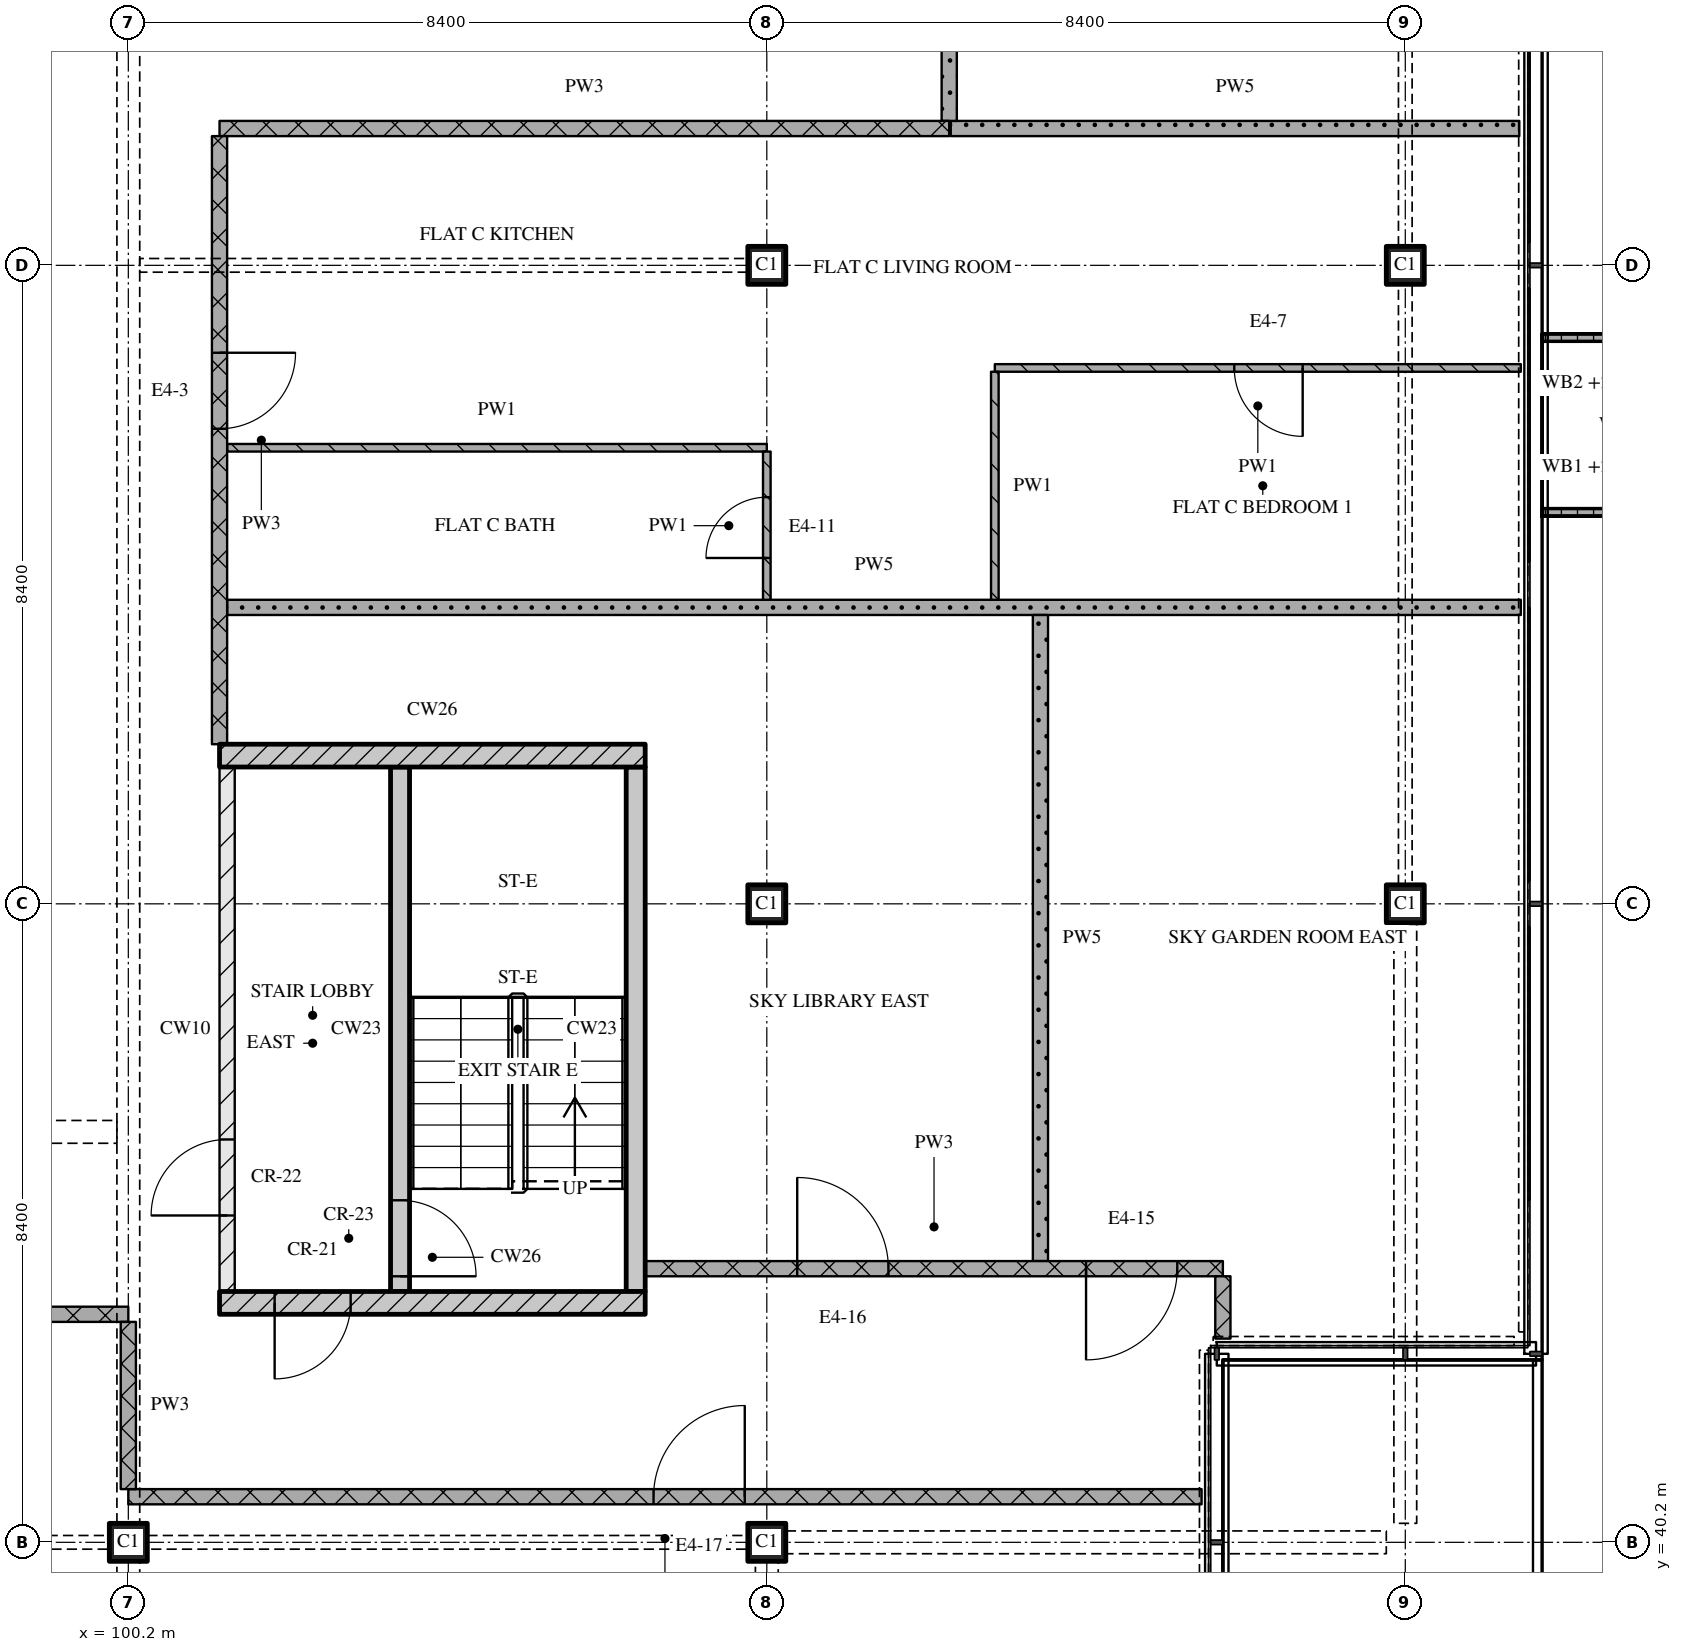
"""IFC4 building model, lengths in metres.
Left out: names, types, materials, properties, quantities, classifications, styles, units other than length and angle.
Written with IfcOpenShell. Run it as: python <this file> out.ifc"""

import sys

from ifc_helpers import new_model, si_unit, direction, frame, frame_2d, origin, origin_2d, place, context, subcontext, project, spatial, polyline, rectangle, outline, extrude, element, fill, save


model = new_model("IFC4")
c1 = context("Model", 3, precision=1e-05, world=origin(), true_north=direction((0.0, 1.0)))
c2 = subcontext(c1, "Body", "Model", "MODEL_VIEW")
j1 = project(units=[si_unit("LENGTHUNIT", "METRE"), si_unit("PLANEANGLEUNIT", "RADIAN")], contexts=[c1])
p1 = place(None, origin())
s1 = spatial("IfcSite", under=j1, at=p1, CompositionType="ELEMENT")
p2 = place(p1, origin())
s2 = spatial("IfcBuilding", under=s1, at=p2, CompositionType="ELEMENT")
p3 = place(p2, frame((0.0, 0.0, 285.15)))
s3 = spatial("IfcBuildingStorey", under=s2, at=p3, CompositionType="ELEMENT", Elevation=285.15)
for number, where, z_axis, x_axis in (
    (1, (100.2, 40.2, 0.0), (0.0, 0.0, 1.0), (1.0, 0.0, 0.0)),
    (2, (108.6, 40.2, 0.0), (0.0, 0.0, 1.0), (1.0, 0.0, 0.0)),
    (3, (108.6, 48.6, 0.0), (0.0, 0.0, 1.0), (1.0, 0.0, 0.0)),
    (4, (108.6, 57.0, 0.0), (0.0, 0.0, 1.0), (1.0, 0.0, 0.0)),
    (5, (117.0, 48.6, 0.0), (0.0, 0.0, 1.0), (1.0, 0.0, 0.0)),
    (6, (117.0, 57.0, 0.0), (0.0, 0.0, 1.0), (1.0, 0.0, 0.0)),
):
    element("IfcColumn", number, at=place(p3, frame(where, z_axis=z_axis, x_axis=x_axis)), inside=s3, PredefinedType="COLUMN", context=c2, shape_type="SweptSolid", body=[
        extrude(rectangle(XDim=0.5, YDim=0.5, at=origin_2d()), origin(), (0.0, 0.0, 1.0), 3.6),
    ])
p4 = place(p3, origin())
e7 = element("IfcWall", 7, at=p4, inside=s3, PredefinedType="SOLIDWALL", context=c2, shape_type="SweptSolid", body=[
    extrude(outline(polyline([(118.8, 53.7), (118.8, 53.8), (120.3, 53.8), (120.3, 56.0), (118.8, 56.0), (118.8, 56.1), (120.4, 56.1), (120.4, 53.7), (118.8, 53.7)])), origin(), (0.0, 0.0, 1.0), 1.0),
])
p5 = place(p3, frame((101.4, 43.35, 0.0), z_axis=(0.0, 0.0, 1.0), x_axis=(1.0, 0.0, 0.0)))
e8 = element("IfcWall", 8, at=p5, inside=s3, PredefinedType="SOLIDWALL", context=c2, shape_type="SweptSolid", body=[
    extrude(rectangle(XDim=5.6, YDim=0.3, at=frame_2d((2.8, 0.0))), origin(), (0.0, 0.0, 1.0), 3.32),
])
p6 = place(p5, frame((0.725, 0.0, 0.0)))
e9 = element("IfcOpeningElement", 9, at=p6, cuts=e8, PredefinedType="OPENING", context=c2, shape_type="SweptSolid", body=[
    extrude(rectangle(XDim=1.0, YDim=2.1, at=frame_2d((0.5, 1.05))), frame((0.0, 0.16, 0.0), z_axis=(0.0, -1.0, 0.0), x_axis=(1.0, 0.0, 0.0)), (0.0, 0.0, 1.0), 0.32),
])
p7 = place(p3, frame((101.5, 43.5, 0.0), z_axis=(0.0, 0.0, 1.0), x_axis=(0.0, 1.0, 0.0)))
e10 = element("IfcWall", 10, at=p7, inside=s3, PredefinedType="PARTITIONING", context=c2, shape_type="SweptSolid", body=[
    extrude(rectangle(XDim=6.9, YDim=0.2, at=frame_2d((3.45, 0.0))), origin(), (0.0, 0.0, 1.0), 3.32),
])
p8 = place(p7, frame((1.0, 0.0, 0.0)))
e11 = element("IfcOpeningElement", 11, at=p8, cuts=e10, PredefinedType="OPENING", context=c2, shape_type="SweptSolid", body=[
    extrude(rectangle(XDim=1.0, YDim=2.1, at=frame_2d((0.5, 1.05))), frame((0.0, 0.11, 0.0), z_axis=(0.0, -1.0, 0.0), x_axis=(1.0, 0.0, 0.0)), (0.0, 0.0, 1.0), 0.22),
])
p9 = place(p3, frame((103.775, 43.5, 0.0), z_axis=(0.0, 0.0, 1.0), x_axis=(0.0, 1.0, 0.0)))
e12 = element("IfcWall", 12, at=p9, inside=s3, PredefinedType="SOLIDWALL", context=c2, shape_type="SweptSolid", body=[
    extrude(rectangle(XDim=6.9, YDim=0.25, at=frame_2d((3.45, 0.0))), origin(), (0.0, 0.0, 1.0), 3.32),
])
p10 = place(p9, frame((0.2, 0.0, 0.0)))
e13 = element("IfcOpeningElement", 13, at=p10, cuts=e12, PredefinedType="OPENING", context=c2, shape_type="SweptSolid", body=[
    extrude(rectangle(XDim=1.0, YDim=2.1, at=frame_2d((0.5, 1.05))), frame((0.0, 0.135, 0.0), z_axis=(0.0, -1.0, 0.0), x_axis=(1.0, 0.0, 0.0)), (0.0, 0.0, 1.0), 0.27),
])
p11 = place(p3, frame((106.875, 43.5, 0.0), z_axis=(0.0, 0.0, 1.0), x_axis=(0.0, 1.0, 0.0)))
e14 = element("IfcWall", 14, at=p11, inside=s3, PredefinedType="SOLIDWALL", context=c2, shape_type="SweptSolid", body=[
    extrude(rectangle(XDim=6.9, YDim=0.25, at=frame_2d((3.45, 0.0))), origin(), (0.0, 0.0, 1.0), 3.32),
])
p12 = place(p3, frame((101.4, 50.55, 0.0), z_axis=(0.0, 0.0, 1.0), x_axis=(1.0, 0.0, 0.0)))
e15 = element("IfcWall", 15, at=p12, inside=s3, PredefinedType="SOLIDWALL", context=c2, shape_type="SweptSolid", body=[
    extrude(rectangle(XDim=5.6, YDim=0.3, at=frame_2d((2.8, 0.0))), origin(), (0.0, 0.0, 1.0), 3.32),
])
p13 = place(p3, frame((114.32, 40.8, 0.0), z_axis=(0.0, 0.0, 1.0), x_axis=(-1.0, 0.0, 0.0)))
e16 = element("IfcWall", 16, at=p13, inside=s3, PredefinedType="PARTITIONING", context=c2, shape_type="SweptSolid", body=[
    extrude(rectangle(XDim=14.12, YDim=0.2, at=frame_2d((7.06, 0.0))), origin(), (0.0, 0.0, 1.0), 3.32),
])
p14 = place(p13, frame((6.01, 0.0, 0.0)))
e17 = element("IfcOpeningElement", 17, at=p14, cuts=e16, PredefinedType="OPENING", context=c2, shape_type="SweptSolid", body=[
    extrude(rectangle(XDim=1.2, YDim=2.1, at=frame_2d((0.6, 1.05))), frame((0.0, 0.11, 0.0), z_axis=(0.0, -1.0, 0.0), x_axis=(1.0, 0.0, 0.0)), (0.0, 0.0, 1.0), 0.22),
])
p15 = place(p3, frame((100.2, 43.2, 0.0), z_axis=(0.0, 0.0, 1.0), x_axis=(-1.0, 0.0, 0.0)))
e18 = element("IfcWall", 18, at=p15, inside=s3, PredefinedType="PARTITIONING", context=c2, shape_type="SweptSolid", body=[
    extrude(rectangle(XDim=25.2, YDim=0.2, at=frame_2d((12.6, 0.0))), origin(), (0.0, 0.0, 1.0), 3.32),
])
p16 = place(p15, frame((5.7, 0.0, 0.0)))
e19 = element("IfcOpeningElement", 19, at=p16, cuts=e18, PredefinedType="OPENING", context=c2, shape_type="SweptSolid", body=[
    extrude(rectangle(XDim=1.2, YDim=2.1, at=frame_2d((0.6, 1.05))), frame((0.0, 0.11, 0.0), z_axis=(0.0, -1.0, 0.0), x_axis=(1.0, 0.0, 0.0)), (0.0, 0.0, 1.0), 0.22),
])
p17 = place(p15, frame((18.3, 0.0, 0.0)))
e20 = element("IfcOpeningElement", 20, at=p17, cuts=e18, PredefinedType="OPENING", context=c2, shape_type="SweptSolid", body=[
    extrude(rectangle(XDim=1.2, YDim=2.1, at=frame_2d((0.6, 1.05))), frame((0.0, 0.11, 0.0), z_axis=(0.0, -1.0, 0.0), x_axis=(1.0, 0.0, 0.0)), (0.0, 0.0, 1.0), 0.22),
])
p18 = place(p3, frame((107.0, 43.8, 0.0), z_axis=(0.0, 0.0, 1.0), x_axis=(1.0, 0.0, 0.0)))
e21 = element("IfcWall", 21, at=p18, inside=s3, PredefinedType="PARTITIONING", context=c2, shape_type="SweptSolid", body=[
    extrude(rectangle(XDim=7.6, YDim=0.2, at=frame_2d((3.8, 0.0))), origin(), (0.0, 0.0, 1.0), 3.32),
])
p19 = place(p18, frame((2.0, 0.0, 0.0)))
e22 = element("IfcOpeningElement", 22, at=p19, cuts=e21, PredefinedType="OPENING", context=c2, shape_type="SweptSolid", body=[
    extrude(rectangle(XDim=1.2, YDim=2.1, at=frame_2d((0.6, 1.05))), frame((0.0, 0.11, 0.0), z_axis=(0.0, -1.0, 0.0), x_axis=(1.0, 0.0, 0.0)), (0.0, 0.0, 1.0), 0.22),
])
p20 = place(p18, frame((5.8, 0.0, 0.0)))
e23 = element("IfcOpeningElement", 23, at=p20, cuts=e21, PredefinedType="OPENING", context=c2, shape_type="SweptSolid", body=[
    extrude(rectangle(XDim=1.2, YDim=2.1, at=frame_2d((0.6, 1.05))), frame((0.0, 0.11, 0.0), z_axis=(0.0, -1.0, 0.0), x_axis=(1.0, 0.0, 0.0)), (0.0, 0.0, 1.0), 0.22),
])
p21 = place(p3, frame((101.5, 52.5, 0.0), z_axis=(0.0, 0.0, 1.0), x_axis=(1.0, 0.0, 0.0)))
e24 = element("IfcWall", 24, at=p21, inside=s3, PredefinedType="PARTITIONING", context=c2, shape_type="SweptSolid", body=[
    extrude(rectangle(XDim=17.02, YDim=0.2, at=frame_2d((8.51, 0.0))), origin(), (0.0, 0.0, 1.0), 3.32),
])
p22 = place(p3, frame((101.5, 54.6, 0.0), z_axis=(0.0, 0.0, 1.0), x_axis=(1.0, 0.0, 0.0)))
e25 = element("IfcWall", 25, at=p22, inside=s3, PredefinedType="PARTITIONING", context=c2, shape_type="SweptSolid", body=[
    extrude(rectangle(XDim=7.1, YDim=0.1, at=frame_2d((3.55, 0.0))), origin(), (0.0, 0.0, 1.0), 3.32),
])
p23 = place(p3, frame((118.52, 55.65, 0.0), z_axis=(0.0, 0.0, 1.0), x_axis=(-1.0, 0.0, 0.0)))
e26 = element("IfcWall", 26, at=p23, inside=s3, PredefinedType="PARTITIONING", context=c2, shape_type="SweptSolid", body=[
    extrude(rectangle(XDim=6.92, YDim=0.1, at=frame_2d((3.46, 0.0))), origin(), (0.0, 0.0, 1.0), 3.32),
])
p24 = place(p23, frame((2.87, 0.0, 0.0)))
e27 = element("IfcOpeningElement", 27, at=p24, cuts=e26, PredefinedType="OPENING", context=c2, shape_type="SweptSolid", body=[
    extrude(rectangle(XDim=0.9, YDim=2.1, at=frame_2d((0.45, 1.05))), frame((0.0, 0.06, 0.0), z_axis=(0.0, -1.0, 0.0), x_axis=(1.0, 0.0, 0.0)), (0.0, 0.0, 1.0), 0.12),
])
p25 = place(p3, frame((101.4, 58.8, 0.0), z_axis=(0.0, 0.0, 1.0), x_axis=(1.0, 0.0, 0.0)))
e28 = element("IfcWall", 28, at=p25, inside=s3, PredefinedType="PARTITIONING", context=c2, shape_type="SweptSolid", body=[
    extrude(rectangle(XDim=9.6, YDim=0.2, at=frame_2d((4.8, 0.0))), origin(), (0.0, 0.0, 1.0), 3.32),
])
p26 = place(p3, frame((111.02, 58.8, 0.0), z_axis=(0.0, 0.0, 1.0), x_axis=(1.0, 0.0, 0.0)))
e29 = element("IfcWall", 29, at=p26, inside=s3, PredefinedType="PARTITIONING", context=c2, shape_type="SweptSolid", body=[
    extrude(rectangle(XDim=7.48, YDim=0.2, at=frame_2d((3.74, 0.0))), origin(), (0.0, 0.0, 1.0), 3.32),
])
p27 = place(p3, frame((100.2, 43.1, 0.0), z_axis=(0.0, 0.0, 1.0), x_axis=(0.0, -1.0, 0.0)))
e30 = element("IfcWall", 30, at=p27, inside=s3, PredefinedType="PARTITIONING", context=c2, shape_type="SweptSolid", body=[
    extrude(rectangle(XDim=2.2, YDim=0.2, at=frame_2d((1.1, 0.0))), origin(), (0.0, 0.0, 1.0), 2.53),
])
p28 = place(p3, frame((101.4, 58.7, 0.0), z_axis=(0.0, 0.0, 1.0), x_axis=(0.0, -1.0, 0.0)))
e31 = element("IfcWall", 31, at=p28, inside=s3, PredefinedType="PARTITIONING", context=c2, shape_type="SweptSolid", body=[
    extrude(rectangle(XDim=8.0, YDim=0.2, at=frame_2d((4.0, 0.0))), origin(), (0.0, 0.0, 1.0), 3.32),
])
p29 = place(p28, frame((2.85, 0.0, 0.0)))
e32 = element("IfcOpeningElement", 32, at=p29, cuts=e31, PredefinedType="OPENING", context=c2, shape_type="SweptSolid", body=[
    extrude(rectangle(XDim=1.0, YDim=2.1, at=frame_2d((0.5, 1.05))), frame((0.0, 0.11, 0.0), z_axis=(0.0, -1.0, 0.0), x_axis=(1.0, 0.0, 0.0)), (0.0, 0.0, 1.0), 0.22),
])
p30 = place(p3, frame((108.6, 52.6, 0.0), z_axis=(0.0, 0.0, 1.0), x_axis=(0.0, 1.0, 0.0)))
e33 = element("IfcWall", 33, at=p30, inside=s3, PredefinedType="PARTITIONING", context=c2, shape_type="SweptSolid", body=[
    extrude(rectangle(XDim=1.95, YDim=0.1, at=frame_2d((0.975, 0.0))), origin(), (0.0, 0.0, 1.0), 3.32),
])
p31 = place(p30, frame((0.55, 0.0, 0.0)))
e34 = element("IfcOpeningElement", 34, at=p31, cuts=e33, PredefinedType="OPENING", context=c2, shape_type="SweptSolid", body=[
    extrude(rectangle(XDim=0.8, YDim=2.1, at=frame_2d((0.4, 1.05))), frame((0.0, 0.06, 0.0), z_axis=(0.0, -1.0, 0.0), x_axis=(1.0, 0.0, 0.0)), (0.0, 0.0, 1.0), 0.12),
])
p32 = place(p3, frame((111.0, 61.1, 0.0), z_axis=(0.0, 0.0, 1.0), x_axis=(0.0, -1.0, 0.0)))
e35 = element("IfcWall", 35, at=p32, inside=s3, PredefinedType="PARTITIONING", context=c2, shape_type="SweptSolid", body=[
    extrude(rectangle(XDim=2.2, YDim=0.2, at=frame_2d((1.1, 0.0))), origin(), (0.0, 0.0, 1.0), 3.32),
])
p33 = place(p3, frame((111.6, 55.6, 0.0), z_axis=(0.0, 0.0, 1.0), x_axis=(0.0, -1.0, 0.0)))
e36 = element("IfcWall", 36, at=p33, inside=s3, PredefinedType="PARTITIONING", context=c2, shape_type="SweptSolid", body=[
    extrude(rectangle(XDim=3.0, YDim=0.1, at=frame_2d((1.5, 0.0))), origin(), (0.0, 0.0, 1.0), 3.32),
])
p34 = place(p3, frame((112.2, 52.4, 0.0), z_axis=(0.0, 0.0, 1.0), x_axis=(0.0, -1.0, 0.0)))
e37 = element("IfcWall", 37, at=p34, inside=s3, PredefinedType="PARTITIONING", context=c2, shape_type="SweptSolid", body=[
    extrude(rectangle(XDim=8.5, YDim=0.2, at=frame_2d((4.25, 0.0))), origin(), (0.0, 0.0, 1.0), 3.32),
])
p35 = place(p3, frame((114.6, 43.7, 0.0), z_axis=(0.0, 0.0, 1.0), x_axis=(0.0, -1.0, 0.0)))
e38 = element("IfcWall", 38, at=p35, inside=s3, PredefinedType="PARTITIONING", context=c2, shape_type="SweptSolid", body=[
    extrude(rectangle(XDim=0.82, YDim=0.2, at=frame_2d((0.41, 0.0))), origin(), (0.0, 0.0, 1.0), 3.32),
])
p36 = place(p6, origin())
e39 = element("IfcDoor", 39, at=p36, inside=s3, OperationType="SINGLE_SWING_RIGHT", PredefinedType="DOOR", context=c2, shape_type="SweptSolid", body=[
    extrude(rectangle(XDim=1.0, YDim=2.1, at=frame_2d((0.5, 1.05))), frame((0.0, 0.025, 0.0), z_axis=(0.0, -1.0, 0.0), x_axis=(1.0, 0.0, 0.0)), (0.0, 0.0, 1.0), 0.05),
])
fill(e9, e39)
p37 = place(p10, origin())
e40 = element("IfcDoor", 40, at=p37, inside=s3, OperationType="SINGLE_SWING_RIGHT", PredefinedType="DOOR", context=c2, shape_type="SweptSolid", body=[
    extrude(rectangle(XDim=1.0, YDim=2.1, at=frame_2d((0.5, 1.05))), frame((0.0, 0.025, 0.0), z_axis=(0.0, -1.0, 0.0), x_axis=(1.0, 0.0, 0.0)), (0.0, 0.0, 1.0), 0.05),
])
fill(e13, e40)
p38 = place(p8, origin())
e41 = element("IfcDoor", 41, at=p38, inside=s3, OperationType="SINGLE_SWING_LEFT", PredefinedType="DOOR", context=c2, shape_type="SweptSolid", body=[
    extrude(rectangle(XDim=1.0, YDim=2.1, at=frame_2d((0.5, 1.05))), frame((0.0, 0.025, 0.0), z_axis=(0.0, -1.0, 0.0), x_axis=(1.0, 0.0, 0.0)), (0.0, 0.0, 1.0), 0.05),
])
fill(e11, e41)
p39 = place(p14, origin())
e42 = element("IfcDoor", 42, at=p39, inside=s3, OperationType="SINGLE_SWING_RIGHT", PredefinedType="DOOR", context=c2, shape_type="SweptSolid", body=[
    extrude(rectangle(XDim=1.2, YDim=2.1, at=frame_2d((0.6, 1.05))), frame((0.0, 0.025, 0.0), z_axis=(0.0, -1.0, 0.0), x_axis=(1.0, 0.0, 0.0)), (0.0, 0.0, 1.0), 0.05),
])
fill(e17, e42)
p40 = place(p19, origin())
e43 = element("IfcDoor", 43, at=p40, inside=s3, OperationType="SINGLE_SWING_LEFT", PredefinedType="DOOR", context=c2, shape_type="SweptSolid", body=[
    extrude(rectangle(XDim=1.2, YDim=2.1, at=frame_2d((0.6, 1.05))), frame((0.0, 0.025, 0.0), z_axis=(0.0, -1.0, 0.0), x_axis=(1.0, 0.0, 0.0)), (0.0, 0.0, 1.0), 0.05),
])
fill(e22, e43)
p41 = place(p20, origin())
e44 = element("IfcDoor", 44, at=p41, inside=s3, OperationType="SINGLE_SWING_RIGHT", PredefinedType="DOOR", context=c2, shape_type="SweptSolid", body=[
    extrude(rectangle(XDim=1.2, YDim=2.1, at=frame_2d((0.6, 1.05))), frame((0.0, 0.025, 0.0), z_axis=(0.0, -1.0, 0.0), x_axis=(1.0, 0.0, 0.0)), (0.0, 0.0, 1.0), 0.05),
])
fill(e23, e44)
p42 = place(p24, origin())
e45 = element("IfcDoor", 45, at=p42, inside=s3, OperationType="SINGLE_SWING_LEFT", PredefinedType="DOOR", context=c2, shape_type="SweptSolid", body=[
    extrude(rectangle(XDim=0.9, YDim=2.1, at=frame_2d((0.45, 1.05))), frame((0.0, 0.025, 0.0), z_axis=(0.0, -1.0, 0.0), x_axis=(1.0, 0.0, 0.0)), (0.0, 0.0, 1.0), 0.05),
])
fill(e27, e45)
p43 = place(p29, origin())
e46 = element("IfcDoor", 46, at=p43, inside=s3, OperationType="SINGLE_SWING_LEFT", PredefinedType="DOOR", context=c2, shape_type="SweptSolid", body=[
    extrude(rectangle(XDim=1.0, YDim=2.1, at=frame_2d((0.5, 1.05))), frame((0.0, 0.025, 0.0), z_axis=(0.0, -1.0, 0.0), x_axis=(1.0, 0.0, 0.0)), (0.0, 0.0, 1.0), 0.05),
])
fill(e32, e46)
p44 = place(p31, origin())
e47 = element("IfcDoor", 47, at=p44, inside=s3, OperationType="SINGLE_SWING_LEFT", PredefinedType="DOOR", context=c2, shape_type="SweptSolid", body=[
    extrude(rectangle(XDim=0.8, YDim=2.1, at=frame_2d((0.4, 1.05))), frame((0.0, 0.025, 0.0), z_axis=(0.0, -1.0, 0.0), x_axis=(1.0, 0.0, 0.0)), (0.0, 0.0, 1.0), 0.05),
])
fill(e34, e47)
save(model, sys.argv[1])
